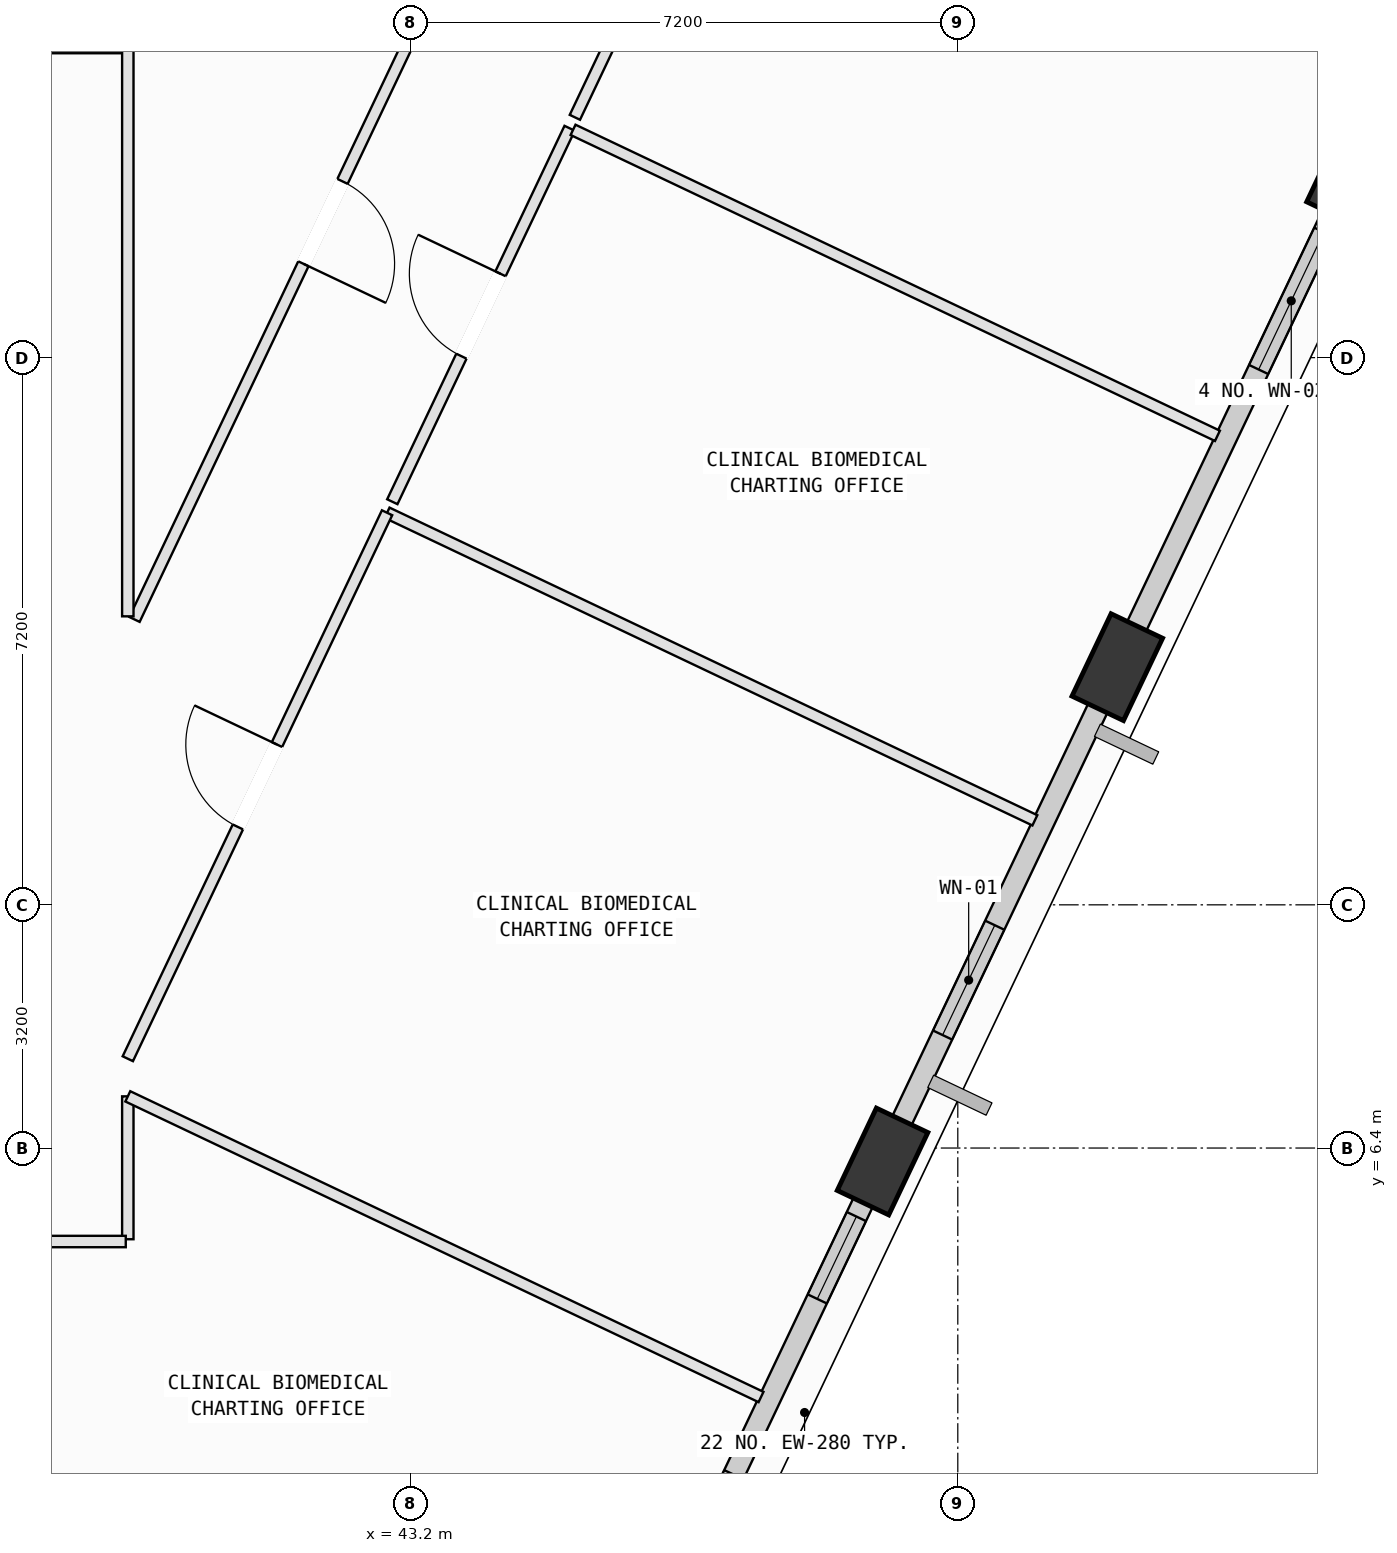
"""IFC4 building model, lengths in metres.
Left out: names, types, materials, properties, quantities, classifications, styles, units other than length and angle.
Written with IfcOpenShell. Run it as: python <this file> out.ifc"""

import sys

from ifc_helpers import new_model, si_unit, direction, frame, frame_2d, origin, origin_2d, place, context, subcontext, project, spatial, rectangle, extrude, element, fill, save


model = new_model("IFC4")
c1 = context("Model", 3, precision=1e-05, world=origin(), true_north=direction((0.0, 1.0)))
c2 = subcontext(c1, "Body", "Model", "MODEL_VIEW")
j1 = project(units=[si_unit("LENGTHUNIT", "METRE"), si_unit("PLANEANGLEUNIT", "RADIAN")], contexts=[c1])
p1 = place(None, origin())
s1 = spatial("IfcSite", under=j1, at=p1, CompositionType="ELEMENT")
p2 = place(p1, origin())
s2 = spatial("IfcBuilding", under=s1, at=p2, CompositionType="ELEMENT")
p3 = place(p2, frame((0.0, 0.0, 300.6)))
s3 = spatial("IfcBuildingStorey", under=s2, at=p3, CompositionType="ELEMENT", Elevation=300.6)
p4 = place(p3, frame((49.41, 6.223, 0.002), z_axis=(0.076097885898, 0.065825886923, 0.994925155161), x_axis=(-0.960348129211, -0.263571984323, 0.090891582674)))
e1 = element("IfcColumn", 1, at=p4, inside=s3, PredefinedType="COLUMN", context=c2, shape_type="SweptSolid", body=[
    extrude(rectangle(XDim=1.2, YDim=0.75, at=origin_2d()), origin(), (0.0, 0.0, 1.0), 4.017),
])
p5 = place(p3, frame((52.498, 12.727, 0.002), z_axis=(0.04914978731, 0.078408509707, 0.995708995647), x_axis=(-0.841156685333, -0.534291503699, 0.083594376567)))
e2 = element("IfcColumn", 2, at=p5, inside=s3, PredefinedType="COLUMN", context=c2, shape_type="SweptSolid", body=[
    extrude(rectangle(XDim=1.2, YDim=0.75, at=origin_2d()), origin(), (0.0, 0.0, 1.0), 4.014),
])
p6 = place(p3, frame((55.587, 19.231, 0.002), z_axis=(0.022200352556, 0.090930211153, 0.995609783523), x_axis=(-0.630008671759, -0.771971398071, 0.084553143461)))
e3 = element("IfcColumn", 3, at=p6, inside=s3, PredefinedType="COLUMN", context=c2, shape_type="SweptSolid", body=[
    extrude(rectangle(XDim=1.2, YDim=0.75, at=origin_2d()), origin(), (0.0, 0.0, 1.0), 4.014),
])
p7 = place(p3, frame((49.323, 6.039, 0.0), z_axis=(0.0, 0.0, 1.0), x_axis=(-0.42896631969, -0.903320483866, 0.0)))
e4 = element("IfcWall", 4, at=p7, inside=s3, PredefinedType="SOLIDWALL", context=c2, shape_type="SweptSolid", body=[
    extrude(rectangle(XDim=6.439, YDim=0.28, at=frame_2d((3.219, 0.0))), origin(), (0.0, 0.0, 1.0), 3.265),
])
p8 = place(p7, frame((4.358, 0.0, 0.75)))
e5 = element("IfcOpeningElement", 5, at=p8, cuts=e4, PredefinedType="OPENING", context=c2, shape_type="SweptSolid", body=[
    extrude(rectangle(XDim=1.2, YDim=1.75, at=frame_2d((0.6, 0.875))), frame((0.0, 0.15, 0.0), z_axis=(0.0, -1.0, 0.0), x_axis=(1.0, 0.0, 0.0)), (0.0, 0.0, 1.0), 0.3),
])
p9 = place(p7, frame((0.598, 0.0, 0.75)))
e6 = element("IfcOpeningElement", 6, at=p9, cuts=e4, PredefinedType="OPENING", context=c2, shape_type="SweptSolid", body=[
    extrude(rectangle(XDim=1.2, YDim=1.75, at=frame_2d((0.6, 0.875))), frame((0.0, 0.15, 0.0), z_axis=(0.0, -1.0, 0.0), x_axis=(1.0, 0.0, 0.0)), (0.0, 0.0, 1.0), 0.3),
])
p10 = place(p3, frame((52.407, 12.535, 0.0), z_axis=(0.0, 0.0, 1.0), x_axis=(-0.428909274497, -0.903347571121, 0.0)))
e7 = element("IfcWall", 7, at=p10, inside=s3, PredefinedType="SOLIDWALL", context=c2, shape_type="SweptSolid", body=[
    extrude(rectangle(XDim=6.413, YDim=0.28, at=frame_2d((3.207, 0.0))), origin(), (0.0, 0.0, 1.0), 3.265),
])
p11 = place(p10, frame((3.546, 0.0, 0.75)))
e8 = element("IfcOpeningElement", 8, at=p11, cuts=e7, PredefinedType="OPENING", context=c2, shape_type="SweptSolid", body=[
    extrude(rectangle(XDim=1.6, YDim=1.95, at=frame_2d((0.8, 0.975))), frame((0.0, 0.15, 0.0), z_axis=(0.0, -1.0, 0.0), x_axis=(1.0, 0.0, 0.0)), (0.0, 0.0, 1.0), 0.3),
])
p12 = place(p3, frame((55.496, 19.04, 0.0), z_axis=(0.0, 0.0, 1.0), x_axis=(-0.428921563444, -0.903341736229, 0.0)))
e9 = element("IfcWall", 9, at=p12, inside=s3, PredefinedType="SOLIDWALL", context=c2, shape_type="SweptSolid", body=[
    extrude(rectangle(XDim=6.407, YDim=0.28, at=frame_2d((3.204, 0.0))), origin(), (0.0, 0.0, 1.0), 3.265),
])
p13 = place(p12, frame((0.652, 0.0, 0.75)))
e10 = element("IfcOpeningElement", 10, at=p13, cuts=e9, PredefinedType="OPENING", context=c2, shape_type="SweptSolid", body=[
    extrude(rectangle(XDim=2.0, YDim=1.95, at=frame_2d((1.0, 0.975))), frame((0.0, 0.15, 0.0), z_axis=(0.0, -1.0, 0.0), x_axis=(1.0, 0.0, 0.0)), (0.0, 0.0, 1.0), 0.3),
])
p14 = place(p3, frame((36.886, 2.112, 0.0), z_axis=(0.0, 0.0, 1.0), x_axis=(0.903330146776, -0.428945970871, 0.0)))
e11 = element("IfcWall", 11, at=p14, inside=s3, PredefinedType="PARTITIONING", context=c2, shape_type="SweptSolid", body=[
    extrude(rectangle(XDim=9.435, YDim=0.15, at=frame_2d((4.718, 0.0))), origin(), (0.0, 0.0, 1.0), 3.78),
])
p15 = place(p3, frame((39.48, 5.2, 0.0), z_axis=(0.0, 0.0, 1.0), x_axis=(0.0, 1.0, 0.0)))
e12 = element("IfcWall", 12, at=p15, inside=s3, PredefinedType="PARTITIONING", context=c2, shape_type="SweptSolid", body=[
    extrude(rectangle(XDim=1.88, YDim=0.15, at=frame_2d((0.94, 0.0))), origin(), (0.0, 0.0, 1.0), 3.78),
])
p16 = place(p3, frame((39.48, 7.08, 0.0), z_axis=(0.0, 0.0, 1.0), x_axis=(0.903327769152, -0.428950977943, 0.0)))
e13 = element("IfcWall", 13, at=p16, inside=s3, PredefinedType="PARTITIONING", context=c2, shape_type="SweptSolid", body=[
    extrude(rectangle(XDim=9.223, YDim=0.15, at=frame_2d((4.611, 0.0))), origin(), (0.0, 0.0, 1.0), 3.165),
])
p17 = place(p3, frame((38.338, 5.17, 0.0), z_axis=(0.0, 0.0, 1.0), x_axis=(1.0, 0.0, 0.0)))
e14 = element("IfcWall", 14, at=p17, inside=s3, PredefinedType="PARTITIONING", context=c2, shape_type="SweptSolid", body=[
    extrude(rectangle(XDim=1.115, YDim=0.15, at=frame_2d((0.558, 0.0))), origin(), (0.0, 0.0, 1.0), 3.78),
])
p18 = place(p3, frame((42.891, 14.759, 0.0), z_axis=(0.0, 0.0, 1.0), x_axis=(0.903330146776, -0.428945970871, 0.0)))
e15 = element("IfcWall", 15, at=p18, inside=s3, PredefinedType="PARTITIONING", context=c2, shape_type="SweptSolid", body=[
    extrude(rectangle(XDim=9.435, YDim=0.15, at=frame_2d((4.718, 0.0))), origin(), (0.0, 0.0, 1.0), 3.78),
])
p19 = place(p3, frame((49.864, 6.643, 0.0), z_axis=(0.0, 0.0, 1.0), x_axis=(-0.429056814568, -0.903277504354, 0.0)))
e16 = element("IfcWall", 16, at=p19, inside=s3, PredefinedType="PARTITIONING", context=c2, shape_type="SweptSolid", body=[
    extrude(rectangle(XDim=0.778, YDim=0.15, at=frame_2d((0.389, 0.0))), origin(), (0.0, 0.0, 1.0), 3.265),
])
p20 = place(p3, frame((39.48, 7.575, 0.0), z_axis=(0.0, 0.0, 1.0), x_axis=(0.428922806164, 0.903341146163, 0.0)))
e17 = element("IfcWall", 17, at=p20, inside=s3, PredefinedType="PARTITIONING", context=c2, shape_type="SweptSolid", body=[
    extrude(rectangle(XDim=7.953, YDim=0.15, at=frame_2d((3.977, 0.0))), origin(), (0.0, 0.0, 1.0), 3.78),
])
p21 = place(p20, frame((3.376, 0.0, 0.0)))
e18 = element("IfcOpeningElement", 18, at=p21, cuts=e17, PredefinedType="OPENING", context=c2, shape_type="SweptSolid", body=[
    extrude(rectangle(XDim=1.2, YDim=2.15, at=frame_2d((0.6, 1.075))), frame((0.0, 0.085, 0.0), z_axis=(0.0, -1.0, 0.0), x_axis=(1.0, 0.0, 0.0)), (0.0, 0.0, 1.0), 0.17),
])
p22 = place(p3, frame((42.96, 14.904, 0.0), z_axis=(0.0, 0.0, 1.0), x_axis=(0.428881036616, 0.903360977921, 0.0)))
e19 = element("IfcWall", 19, at=p22, inside=s3, PredefinedType="PARTITIONING", context=c2, shape_type="SweptSolid", body=[
    extrude(rectangle(XDim=5.44, YDim=0.15, at=frame_2d((2.72, 0.0))), origin(), (0.0, 0.0, 1.0), 3.78),
])
p23 = place(p22, frame((2.12, 0.0, 0.0)))
e20 = element("IfcOpeningElement", 20, at=p23, cuts=e19, PredefinedType="OPENING", context=c2, shape_type="SweptSolid", body=[
    extrude(rectangle(XDim=1.2, YDim=2.15, at=frame_2d((0.6, 1.075))), frame((0.0, 0.085, 0.0), z_axis=(0.0, -1.0, 0.0), x_axis=(1.0, 0.0, 0.0)), (0.0, 0.0, 1.0), 0.17),
])
p24 = place(p3, frame((45.338, 19.797, 0.0), z_axis=(0.0, 0.0, 1.0), x_axis=(0.90331631407, -0.428975100367, 0.0)))
e21 = element("IfcWall", 21, at=p24, inside=s3, PredefinedType="PARTITIONING", context=c2, shape_type="SweptSolid", body=[
    extrude(rectangle(XDim=9.385, YDim=0.15, at=frame_2d((4.693, 0.0))), origin(), (0.0, 0.0, 1.0), 3.78),
])
p25 = place(p3, frame((52.955, 13.154, 0.0), z_axis=(0.0, 0.0, 1.0), x_axis=(-0.428535912519, -0.903524748793, 0.0)))
e22 = element("IfcWall", 22, at=p25, inside=s3, PredefinedType="PARTITIONING", context=c2, shape_type="SweptSolid", body=[
    extrude(rectangle(XDim=0.794, YDim=0.15, at=frame_2d((0.397, 0.0))), origin(), (0.0, 0.0, 1.0), 3.265),
])
p26 = place(p3, frame((45.362, 19.962, 0.0), z_axis=(0.0, 0.0, 1.0), x_axis=(0.428857978155, 0.903371924831, 0.0)))
e23 = element("IfcWall", 23, at=p26, inside=s3, PredefinedType="PARTITIONING", context=c2, shape_type="SweptSolid", body=[
    extrude(rectangle(XDim=8.24, YDim=0.15, at=frame_2d((4.12, 0.0))), origin(), (0.0, 0.0, 1.0), 3.415),
])
p27 = place(p26, frame((3.52, 0.0, 0.0)))
e24 = element("IfcOpeningElement", 24, at=p27, cuts=e23, PredefinedType="OPENING", context=c2, shape_type="SweptSolid", body=[
    extrude(rectangle(XDim=1.2, YDim=2.15, at=frame_2d((0.6, 1.075))), frame((0.0, 0.085, 0.0), z_axis=(0.0, -1.0, 0.0), x_axis=(1.0, 0.0, 0.0)), (0.0, 0.0, 1.0), 0.17),
])
p28 = place(p3, frame((39.45, 20.88, 0.0), z_axis=(0.0, 0.0, 1.0), x_axis=(-1.0, 0.0, 0.0)))
e25 = element("IfcWall", 25, at=p28, inside=s3, PredefinedType="PARTITIONING", context=c2, shape_type="SweptSolid", body=[
    extrude(rectangle(XDim=6.09, YDim=0.15, at=frame_2d((3.045, 0.0))), origin(), (0.0, 0.0, 1.0), 3.415),
])
p29 = place(p3, frame((44.527, 23.799, 0.0), z_axis=(0.0, 0.0, 1.0), x_axis=(-0.428918545399, -0.90334316924, 0.0)))
e26 = element("IfcWall", 26, at=p29, inside=s3, PredefinedType="PARTITIONING", context=c2, shape_type="SweptSolid", body=[
    extrude(rectangle(XDim=11.562, YDim=0.15, at=frame_2d((5.781, 0.0))), origin(), (0.0, 0.0, 1.0), 3.78),
])
p30 = place(p29, frame((5.181, 0.0, 0.0)))
e27 = element("IfcOpeningElement", 27, at=p30, cuts=e26, PredefinedType="OPENING", context=c2, shape_type="SweptSolid", body=[
    extrude(rectangle(XDim=1.2, YDim=2.15, at=frame_2d((0.6, 1.075))), frame((0.0, 0.085, 0.0), z_axis=(0.0, -1.0, 0.0), x_axis=(1.0, 0.0, 0.0)), (0.0, 0.0, 1.0), 0.17),
])
p31 = place(p3, frame((39.48, 13.396, 0.0), z_axis=(0.0, 0.0, 1.0), x_axis=(0.0, 1.0, 0.0)))
e28 = element("IfcWall", 28, at=p31, inside=s3, PredefinedType="PARTITIONING", context=c2, shape_type="SweptSolid", body=[
    extrude(rectangle(XDim=7.457, YDim=0.15, at=frame_2d((3.729, 0.0))), origin(), (0.0, 0.0, 1.0), 3.78),
])
p32 = place(p9, origin())
e29 = element("IfcWindow", 29, at=p32, inside=s3, PartitioningType="SINGLE_PANEL", PredefinedType="WINDOW", context=c2, shape_type="SweptSolid", body=[
    extrude(rectangle(XDim=1.2, YDim=1.75, at=frame_2d((0.6, 0.875))), frame((0.0, 0.03, 0.0), z_axis=(0.0, -1.0, 0.0), x_axis=(1.0, 0.0, 0.0)), (0.0, 0.0, 1.0), 0.06),
])
fill(e6, e29)
p33 = place(p11, origin())
e30 = element("IfcWindow", 30, at=p33, inside=s3, PartitioningType="SINGLE_PANEL", PredefinedType="WINDOW", context=c2, shape_type="SweptSolid", body=[
    extrude(rectangle(XDim=1.6, YDim=1.95, at=frame_2d((0.8, 0.975))), frame((0.0, 0.03, 0.0), z_axis=(0.0, -1.0, 0.0), x_axis=(1.0, 0.0, 0.0)), (0.0, 0.0, 1.0), 0.06),
])
fill(e8, e30)
p34 = place(p13, origin())
e31 = element("IfcWindow", 31, at=p34, inside=s3, PartitioningType="SINGLE_PANEL", PredefinedType="WINDOW", context=c2, shape_type="SweptSolid", body=[
    extrude(rectangle(XDim=2.0, YDim=1.95, at=frame_2d((1.0, 0.975))), frame((0.0, 0.03, 0.0), z_axis=(0.0, -1.0, 0.0), x_axis=(1.0, 0.0, 0.0)), (0.0, 0.0, 1.0), 0.06),
])
fill(e10, e31)
p35 = place(p21, origin())
e32 = element("IfcDoor", 32, at=p35, inside=s3, OperationType="SINGLE_SWING_RIGHT", PredefinedType="DOOR", context=c2, shape_type="SweptSolid", body=[
    extrude(rectangle(XDim=1.2, YDim=2.15, at=frame_2d((0.6, 1.075))), frame((0.0, 0.025, 0.0), z_axis=(0.0, -1.0, 0.0), x_axis=(1.0, 0.0, 0.0)), (0.0, 0.0, 1.0), 0.05),
])
fill(e18, e32)
p36 = place(p23, origin())
e33 = element("IfcDoor", 33, at=p36, inside=s3, OperationType="SINGLE_SWING_RIGHT", PredefinedType="DOOR", context=c2, shape_type="SweptSolid", body=[
    extrude(rectangle(XDim=1.2, YDim=2.15, at=frame_2d((0.6, 1.075))), frame((0.0, 0.025, 0.0), z_axis=(0.0, -1.0, 0.0), x_axis=(1.0, 0.0, 0.0)), (0.0, 0.0, 1.0), 0.05),
])
fill(e20, e33)
p37 = place(p30, origin())
e34 = element("IfcDoor", 34, at=p37, inside=s3, OperationType="SINGLE_SWING_RIGHT", PredefinedType="DOOR", context=c2, shape_type="SweptSolid", body=[
    extrude(rectangle(XDim=1.2, YDim=2.15, at=frame_2d((0.6, 1.075))), frame((0.0, 0.025, 0.0), z_axis=(0.0, -1.0, 0.0), x_axis=(1.0, 0.0, 0.0)), (0.0, 0.0, 1.0), 0.05),
])
fill(e27, e34)
save(model, sys.argv[1])
